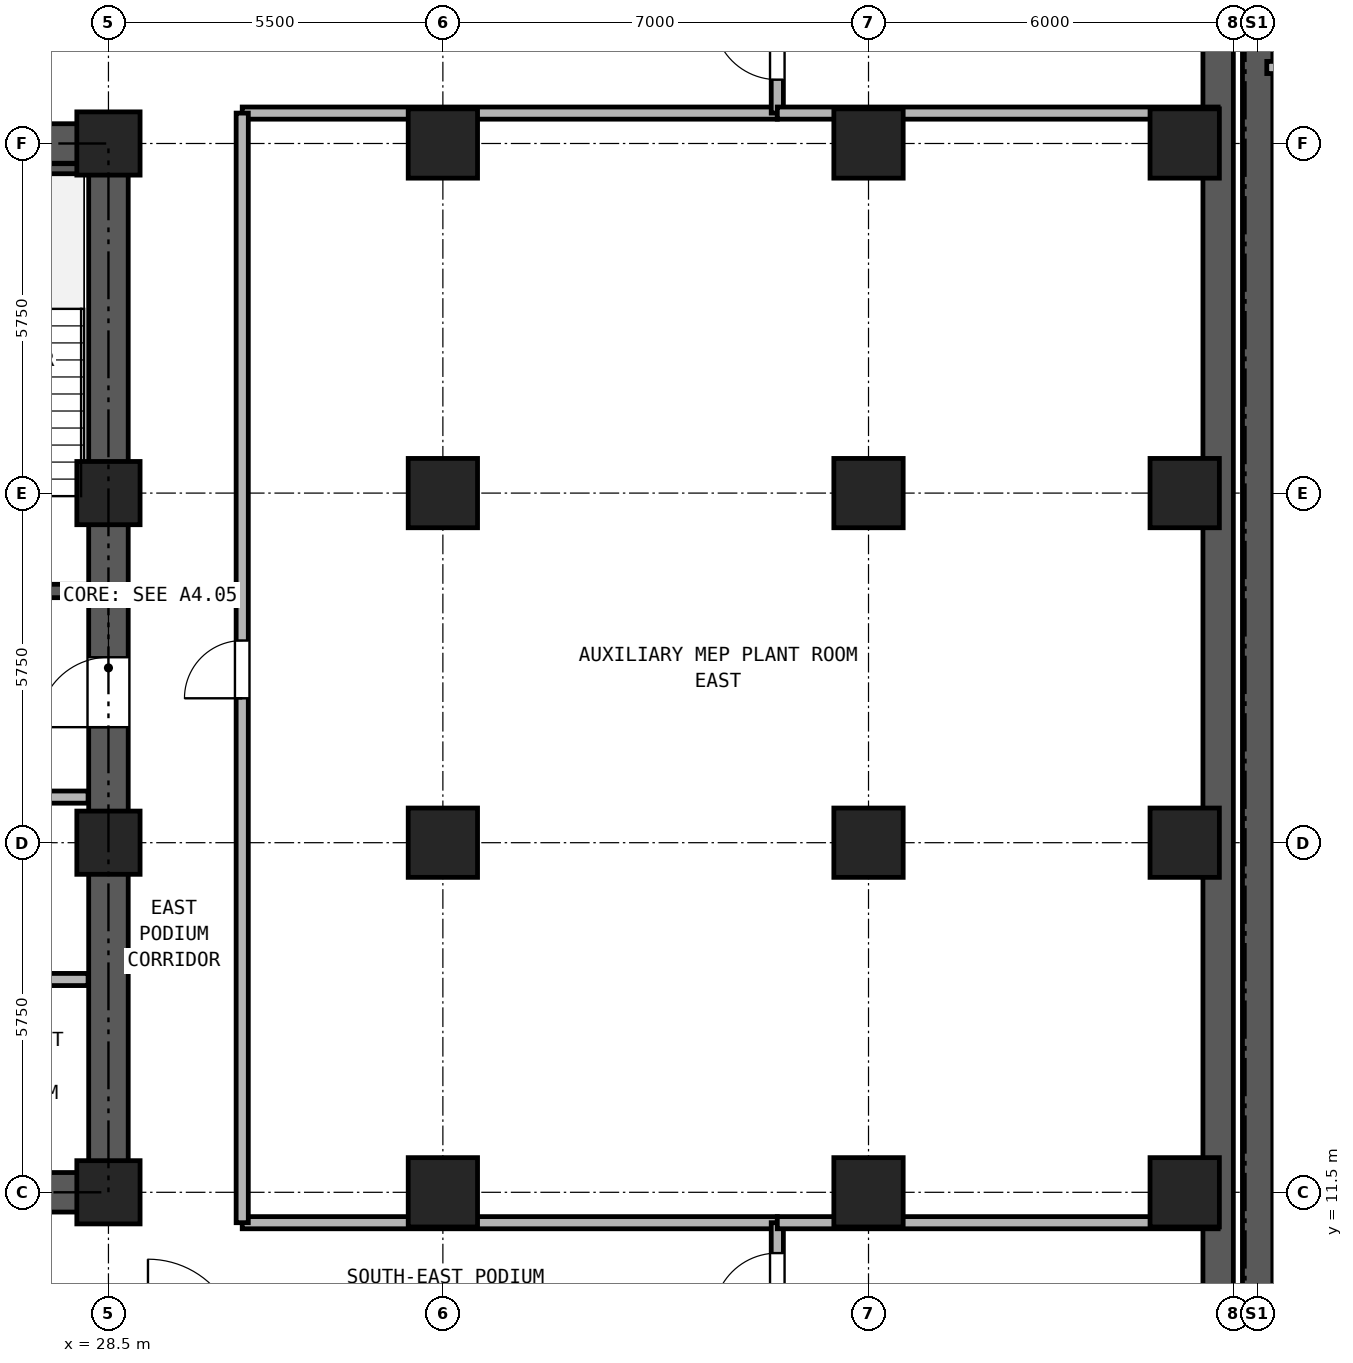
"""IFC4 building model, lengths in metres.
Left out: names, types, materials, properties, quantities, classifications, styles, units other than length and angle.
Written with IfcOpenShell. Run it as: python <this file> out.ifc"""

import sys

from ifc_helpers import new_model, si_unit, direction, frame, frame_2d, origin, origin_2d, place, context, subcontext, project, spatial, rectangle, hollow_rectangle, extrude, source, transform, mapped, element, fill, save


model = new_model("IFC4")
c1 = context("Model", 3, precision=1e-05, world=origin(), true_north=direction((0.0, 1.0)))
c2 = subcontext(c1, "Body", "Model", "MODEL_VIEW")
j1 = project(units=[si_unit("LENGTHUNIT", "METRE"), si_unit("PLANEANGLEUNIT", "RADIAN")], contexts=[c1])
p1 = place(None, origin())
s1 = spatial("IfcSite", under=j1, at=p1, CompositionType="ELEMENT")
p2 = place(p1, origin())
s2 = spatial("IfcBuilding", under=s1, at=p2, CompositionType="ELEMENT")
p3 = place(p2, frame((0.0, 0.0, -8.4)))
s3 = spatial("IfcBuildingStorey", under=s2, at=p3, CompositionType="ELEMENT", Elevation=-8.4)
m1 = source(origin(), c2, "Body", "SweptSolid", [
    extrude(hollow_rectangle(XDim=1.14, YDim=1.14, WallThickness=0.07, at=origin_2d()), origin(), (0.0, 0.0, 1.0), 3.88),
])
for number, where, z_axis, x_axis in (
    (1, (46.2, 11.5, 0.0), (0.0, 0.0, 1.0), (1.0, 0.0, 0.0)),
    (2, (46.2, 17.25, 0.0), (0.0, 0.0, 1.0), (1.0, 0.0, 0.0)),
    (3, (46.2, 23.0, 0.0), (0.0, 0.0, 1.0), (1.0, 0.0, 0.0)),
    (4, (46.2, 28.75, 0.0), (0.0, 0.0, 1.0), (1.0, 0.0, 0.0)),
):
    element("IfcColumn", number, at=place(p3, frame(where, z_axis=z_axis, x_axis=x_axis)), inside=s3, PredefinedType="COLUMN", context=c2, shape_type="MappedRepresentation", body=[
        mapped(m1, transform((0.0, 0.0, 0.0), x_axis=(1.0, 0.0, 0.0), y_axis=(0.0, 1.0, 0.0), z_axis=(0.0, 0.0, 1.0), scale=1.0)),
    ])
m2 = source(origin(), c2, "Body", "SweptSolid", [
    extrude(hollow_rectangle(XDim=1.04, YDim=1.04, WallThickness=0.065, at=origin_2d()), origin(), (0.0, 0.0, 1.0), 3.88),
])
for number, where, z_axis, x_axis in (
    (5, (28.5, 11.5, 0.0), (0.0, 0.0, 1.0), (1.0, 0.0, 0.0)),
    (6, (28.5, 17.25, 0.0), (0.0, 0.0, 1.0), (1.0, 0.0, 0.0)),
    (7, (28.5, 23.0, 0.0), (0.0, 0.0, 1.0), (1.0, 0.0, 0.0)),
    (8, (28.5, 28.75, 0.0), (0.0, 0.0, 1.0), (1.0, 0.0, 0.0)),
):
    element("IfcColumn", number, at=place(p3, frame(where, z_axis=z_axis, x_axis=x_axis)), inside=s3, PredefinedType="COLUMN", context=c2, shape_type="MappedRepresentation", body=[
        mapped(m2, transform((0.0, 0.0, 0.0), x_axis=(1.0, 0.0, 0.0), y_axis=(0.0, 1.0, 0.0), z_axis=(0.0, 0.0, 1.0), scale=1.0)),
    ])
for number, where, z_axis, x_axis in (
    (9, (34.0, 11.5, 0.0), (0.0, 0.0, 1.0), (1.0, 0.0, 0.0)),
    (10, (34.0, 17.25, 0.0), (0.0, 0.0, 1.0), (1.0, 0.0, 0.0)),
    (11, (34.0, 23.0, 0.0), (0.0, 0.0, 1.0), (1.0, 0.0, 0.0)),
    (12, (34.0, 28.75, 0.0), (0.0, 0.0, 1.0), (1.0, 0.0, 0.0)),
    (13, (41.0, 11.5, 0.0), (0.0, 0.0, 1.0), (1.0, 0.0, 0.0)),
    (14, (41.0, 17.25, 0.0), (0.0, 0.0, 1.0), (1.0, 0.0, 0.0)),
    (15, (41.0, 23.0, 0.0), (0.0, 0.0, 1.0), (1.0, 0.0, 0.0)),
    (16, (41.0, 28.75, 0.0), (0.0, 0.0, 1.0), (1.0, 0.0, 0.0)),
):
    element("IfcColumn", number, at=place(p3, frame(where, z_axis=z_axis, x_axis=x_axis)), inside=s3, PredefinedType="COLUMN", context=c2, shape_type="MappedRepresentation", body=[
        mapped(m1, transform((0.0, 0.0, 0.0), x_axis=(1.0, 0.0, 0.0), y_axis=(0.0, 1.0, 0.0), z_axis=(0.0, 0.0, 1.0), scale=1.0)),
    ])
p4 = place(p3, frame((46.75, 4.0, 0.0), z_axis=(0.0, 0.0, 1.0), x_axis=(0.0, 1.0, 0.0)))
e17 = element("IfcWall", 17, at=p4, inside=s3, PredefinedType="USERDEFINED", context=c2, shape_type="SweptSolid", body=[
    extrude(rectangle(XDim=32.5, YDim=0.5, at=frame_2d((16.25, 0.0))), origin(), (0.0, 0.0, 1.0), 3.88),
])
p5 = place(p3, frame((47.4, 40.5, 0.0), z_axis=(0.0, 0.0, 1.0), x_axis=(0.0, -1.0, 0.0)))
e18 = element("IfcWall", 18, at=p5, inside=s3, PredefinedType="USERDEFINED", context=c2, shape_type="SweptSolid", body=[
    extrude(rectangle(XDim=40.9, YDim=0.5, at=frame_2d((20.45, 0.0))), origin(), (0.0, 0.0, 1.0), 3.88),
])
p6 = place(p3, frame((18.175, 11.5, 0.0), z_axis=(0.0, 0.0, 1.0), x_axis=(1.0, 0.0, 0.0)))
e19 = element("IfcWall", 19, at=p6, inside=s3, PredefinedType="SHEAR", context=c2, shape_type="SweptSolid", body=[
    extrude(rectangle(XDim=10.65, YDim=0.65, at=frame_2d((5.325, 0.0))), origin(), (0.0, 0.0, 1.0), 3.88),
])
p7 = place(p6, frame((1.195, 0.0, 0.0)))
e20 = element("IfcOpeningElement", 20, at=p7, cuts=e19, PredefinedType="OPENING", context=c2, shape_type="SweptSolid", body=[
    extrude(rectangle(XDim=1.1, YDim=2.25, at=frame_2d((0.55, 1.125))), frame((0.0, 0.335, 0.0), z_axis=(0.0, -1.0, 0.0), x_axis=(1.0, 0.0, 0.0)), (0.0, 0.0, 1.0), 0.67),
])
p8 = place(p6, frame((3.495, 0.0, 0.0)))
e21 = element("IfcOpeningElement", 21, at=p8, cuts=e19, PredefinedType="OPENING", context=c2, shape_type="SweptSolid", body=[
    extrude(rectangle(XDim=1.1, YDim=2.25, at=frame_2d((0.55, 1.125))), frame((0.0, 0.335, 0.0), z_axis=(0.0, -1.0, 0.0), x_axis=(1.0, 0.0, 0.0)), (0.0, 0.0, 1.0), 0.67),
])
p9 = place(p6, frame((5.925, 0.0, 0.0)))
e22 = element("IfcOpeningElement", 22, at=p9, cuts=e19, PredefinedType="OPENING", context=c2, shape_type="SweptSolid", body=[
    extrude(rectangle(XDim=1.05, YDim=2.15, at=frame_2d((0.525, 1.075))), frame((0.0, 0.335, 0.0), z_axis=(0.0, -1.0, 0.0), x_axis=(1.0, 0.0, 0.0)), (0.0, 0.0, 1.0), 0.67),
])
p10 = place(p6, frame((8.325, 0.0, 0.0)))
e23 = element("IfcOpeningElement", 23, at=p10, cuts=e19, PredefinedType="OPENING", context=c2, shape_type="SweptSolid", body=[
    extrude(rectangle(XDim=1.05, YDim=2.15, at=frame_2d((0.525, 1.075))), frame((0.0, 0.335, 0.0), z_axis=(0.0, -1.0, 0.0), x_axis=(1.0, 0.0, 0.0)), (0.0, 0.0, 1.0), 0.67),
])
p11 = place(p3, frame((18.175, 28.75, 0.0), z_axis=(0.0, 0.0, 1.0), x_axis=(1.0, 0.0, 0.0)))
e24 = element("IfcWall", 24, at=p11, inside=s3, PredefinedType="SHEAR", context=c2, shape_type="SweptSolid", body=[
    extrude(rectangle(XDim=10.65, YDim=0.65, at=frame_2d((5.325, 0.0))), origin(), (0.0, 0.0, 1.0), 3.88),
])
p12 = place(p11, frame((4.205, 0.0, 0.0)))
e25 = element("IfcOpeningElement", 25, at=p12, cuts=e24, PredefinedType="OPENING", context=c2, shape_type="SweptSolid", body=[
    extrude(rectangle(XDim=0.9, YDim=2.05, at=frame_2d((0.45, 1.025))), frame((0.0, 0.335, 0.0), z_axis=(0.0, -1.0, 0.0), x_axis=(1.0, 0.0, 0.0)), (0.0, 0.0, 1.0), 0.67),
])
p13 = place(p11, frame((5.745, 0.0, 0.0)))
e26 = element("IfcOpeningElement", 26, at=p13, cuts=e24, PredefinedType="OPENING", context=c2, shape_type="SweptSolid", body=[
    extrude(rectangle(XDim=0.9, YDim=2.05, at=frame_2d((0.45, 1.025))), frame((0.0, 0.335, 0.0), z_axis=(0.0, -1.0, 0.0), x_axis=(1.0, 0.0, 0.0)), (0.0, 0.0, 1.0), 0.67),
])
p14 = place(p3, frame((28.5, 11.825, 0.0), z_axis=(0.0, 0.0, 1.0), x_axis=(0.0, 1.0, 0.0)))
e27 = element("IfcWall", 27, at=p14, inside=s3, PredefinedType="SHEAR", context=c2, shape_type="SweptSolid", body=[
    extrude(rectangle(XDim=16.6, YDim=0.65, at=frame_2d((8.3, 0.0))), origin(), (0.0, 0.0, 1.0), 3.88),
])
p15 = place(p14, frame((7.325, 0.0, 0.0)))
e28 = element("IfcOpeningElement", 28, at=p15, cuts=e27, PredefinedType="OPENING", context=c2, shape_type="SweptSolid", body=[
    extrude(rectangle(XDim=1.15, YDim=2.2, at=frame_2d((0.575, 1.1))), frame((0.0, 0.335, 0.0), z_axis=(0.0, -1.0, 0.0), x_axis=(1.0, 0.0, 0.0)), (0.0, 0.0, 1.0), 0.67),
])
p16 = place(p3, frame((25.13, 28.335, 0.0), z_axis=(0.0, 0.0, 1.0), x_axis=(1.0, 0.0, 0.0)))
e29 = element("IfcWall", 29, at=p16, inside=s3, PredefinedType="PARTITIONING", context=c2, shape_type="SweptSolid", body=[
    extrude(rectangle(XDim=3.035, YDim=0.165, at=frame_2d((1.518, 0.0))), origin(), (0.0, 0.0, 1.0), 3.88),
])
p17 = place(p3, frame((25.13, 21.39, 0.0), z_axis=(0.0, 0.0, 1.0), x_axis=(1.0, 0.0, 0.0)))
e30 = element("IfcWall", 30, at=p17, inside=s3, PredefinedType="SOLIDWALL", context=c2, shape_type="SweptSolid", body=[
    extrude(rectangle(XDim=3.035, YDim=0.22, at=frame_2d((1.518, 0.0))), origin(), (0.0, 0.0, 1.0), 3.88),
])
p18 = place(p17, frame((0.92, 0.0, 0.0)))
e31 = element("IfcOpeningElement", 31, at=p18, cuts=e30, PredefinedType="OPENING", context=c2, shape_type="SweptSolid", body=[
    extrude(rectangle(XDim=1.15, YDim=2.2, at=frame_2d((0.575, 1.1))), frame((0.0, 0.12, 0.0), z_axis=(0.0, -1.0, 0.0), x_axis=(1.0, 0.0, 0.0)), (0.0, 0.0, 1.0), 0.24),
])
p19 = place(p3, frame((18.835, 18.0, 0.0), z_axis=(0.0, 0.0, 1.0), x_axis=(1.0, 0.0, 0.0)))
e32 = element("IfcWall", 32, at=p19, inside=s3, PredefinedType="PARTITIONING", context=c2, shape_type="SweptSolid", body=[
    extrude(rectangle(XDim=9.33, YDim=0.2, at=frame_2d((4.665, 0.0))), origin(), (0.0, 0.0, 1.0), 3.88),
])
p20 = place(p19, frame((0.415, 0.0, 0.0)))
e33 = element("IfcOpeningElement", 33, at=p20, cuts=e32, PredefinedType="OPENING", context=c2, shape_type="SweptSolid", body=[
    extrude(rectangle(XDim=1.3, YDim=2.3, at=frame_2d((0.65, 1.15))), frame((0.0, 0.11, 0.0), z_axis=(0.0, -1.0, 0.0), x_axis=(1.0, 0.0, 0.0)), (0.0, 0.0, 1.0), 0.22),
])
p21 = place(p19, frame((2.515, 0.0, 0.0)))
e34 = element("IfcOpeningElement", 34, at=p21, cuts=e32, PredefinedType="OPENING", context=c2, shape_type="SweptSolid", body=[
    extrude(rectangle(XDim=1.3, YDim=2.3, at=frame_2d((0.65, 1.15))), frame((0.0, 0.11, 0.0), z_axis=(0.0, -1.0, 0.0), x_axis=(1.0, 0.0, 0.0)), (0.0, 0.0, 1.0), 0.22),
])
p22 = place(p19, frame((7.015, 0.0, 0.0)))
e35 = element("IfcOpeningElement", 35, at=p22, cuts=e32, PredefinedType="OPENING", context=c2, shape_type="SweptSolid", body=[
    extrude(rectangle(XDim=1.0, YDim=2.15, at=frame_2d((0.5, 1.075))), frame((0.0, 0.11, 0.0), z_axis=(0.0, -1.0, 0.0), x_axis=(1.0, 0.0, 0.0)), (0.0, 0.0, 1.0), 0.22),
])
p23 = place(p3, frame((18.835, 15.0, 0.0), z_axis=(0.0, 0.0, 1.0), x_axis=(1.0, 0.0, 0.0)))
e36 = element("IfcWall", 36, at=p23, inside=s3, PredefinedType="PARTITIONING", context=c2, shape_type="SweptSolid", body=[
    extrude(rectangle(XDim=9.33, YDim=0.2, at=frame_2d((4.665, 0.0))), origin(), (0.0, 0.0, 1.0), 3.88),
])
for number, where, z_axis, x_axis in (
    (37, (30.7, 11.0, 0.0), (0.0, 0.0, 1.0), (1.0, 0.0, 0.0)),
    (38, (30.7, 29.25, 0.0), (0.0, 0.0, 1.0), (1.0, 0.0, 0.0)),
):
    element("IfcWall", number, at=place(p3, frame(where, z_axis=z_axis, x_axis=x_axis)), inside=s3, PredefinedType="PARTITIONING", context=c2, shape_type="SweptSolid", body=[
        extrude(rectangle(XDim=8.8, YDim=0.2, at=frame_2d((4.4, 0.0))), origin(), (0.0, 0.0, 1.0), 3.88),
    ])
p24 = place(p3, frame((30.7, 11.0, 0.0), z_axis=(0.0, 0.0, 1.0), x_axis=(0.0, 1.0, 0.0)))
e39 = element("IfcWall", 39, at=p24, inside=s3, PredefinedType="PARTITIONING", context=c2, shape_type="SweptSolid", body=[
    extrude(rectangle(XDim=18.25, YDim=0.2, at=frame_2d((9.125, 0.0))), origin(), (0.0, 0.0, 1.0), 3.88),
])
p25 = place(p24, frame((8.625, 0.0, 0.0)))
e40 = element("IfcOpeningElement", 40, at=p25, cuts=e39, PredefinedType="OPENING", context=c2, shape_type="SweptSolid", body=[
    extrude(rectangle(XDim=0.95, YDim=2.15, at=frame_2d((0.475, 1.075))), frame((0.0, 0.11, 0.0), z_axis=(0.0, -1.0, 0.0), x_axis=(1.0, 0.0, 0.0)), (0.0, 0.0, 1.0), 0.22),
])
p26 = place(p3, frame((39.5, 0.25, 0.0), z_axis=(0.0, 0.0, 1.0), x_axis=(0.0, 1.0, 0.0)))
e41 = element("IfcWall", 41, at=p26, inside=s3, PredefinedType="PARTITIONING", context=c2, shape_type="SweptSolid", body=[
    extrude(rectangle(XDim=10.75, YDim=0.2, at=frame_2d((5.375, 0.0))), origin(), (0.0, 0.0, 1.0), 3.88),
])
p27 = place(p26, frame((9.2, 0.0, 0.0)))
e42 = element("IfcOpeningElement", 42, at=p27, cuts=e41, PredefinedType="OPENING", context=c2, shape_type="SweptSolid", body=[
    extrude(rectangle(XDim=1.05, YDim=2.15, at=frame_2d((0.525, 1.075))), frame((0.0, 0.11, 0.0), z_axis=(0.0, -1.0, 0.0), x_axis=(1.0, 0.0, 0.0)), (0.0, 0.0, 1.0), 0.22),
])
p28 = place(p3, frame((39.5, 29.25, 0.0), z_axis=(0.0, 0.0, 1.0), x_axis=(0.0, 1.0, 0.0)))
e43 = element("IfcWall", 43, at=p28, inside=s3, PredefinedType="PARTITIONING", context=c2, shape_type="SweptSolid", body=[
    extrude(rectangle(XDim=11.0, YDim=0.2, at=frame_2d((5.5, 0.0))), origin(), (0.0, 0.0, 1.0), 3.88),
])
p29 = place(p28, frame((0.55, 0.0, 0.0)))
e44 = element("IfcOpeningElement", 44, at=p29, cuts=e43, PredefinedType="OPENING", context=c2, shape_type="SweptSolid", body=[
    extrude(rectangle(XDim=1.05, YDim=2.15, at=frame_2d((0.525, 1.075))), frame((0.0, 0.11, 0.0), z_axis=(0.0, -1.0, 0.0), x_axis=(1.0, 0.0, 0.0)), (0.0, 0.0, 1.0), 0.22),
])
for number, where, z_axis, x_axis in (
    (45, (39.5, 11.0, 0.0), (0.0, 0.0, 1.0), (1.0, 0.0, 0.0)),
    (46, (39.5, 29.25, 0.0), (0.0, 0.0, 1.0), (1.0, 0.0, 0.0)),
):
    element("IfcWall", number, at=place(p3, frame(where, z_axis=z_axis, x_axis=x_axis)), inside=s3, PredefinedType="PARTITIONING", context=c2, shape_type="SweptSolid", body=[
        extrude(rectangle(XDim=7.25, YDim=0.2, at=frame_2d((3.625, 0.0))), origin(), (0.0, 0.0, 1.0), 3.88),
    ])
p30 = place(p3, frame((47.55, 30.0, 0.0), z_axis=(0.0, 0.0, 1.0), x_axis=(1.0, 0.0, 0.0)))
e47 = element("IfcWall", 47, at=p30, inside=s3, PredefinedType="PARTITIONING", context=c2, shape_type="SweptSolid", body=[
    extrude(rectangle(XDim=23.9, YDim=0.2, at=frame_2d((11.95, 0.0))), origin(), (0.0, 0.0, 1.0), 3.88),
])
p31 = place(p30, frame((3.45, 0.0, 0.0)))
e48 = element("IfcOpeningElement", 48, at=p31, cuts=e47, PredefinedType="OPENING", context=c2, shape_type="SweptSolid", body=[
    extrude(rectangle(XDim=1.3, YDim=2.2, at=frame_2d((0.65, 1.1))), frame((0.0, 0.11, 0.0), z_axis=(0.0, -1.0, 0.0), x_axis=(1.0, 0.0, 0.0)), (0.0, 0.0, 1.0), 0.22),
])
p32 = place(p15, origin())
e49 = element("IfcDoor", 49, at=p32, inside=s3, OperationType="SINGLE_SWING_LEFT", PredefinedType="DOOR", context=c2, shape_type="SweptSolid", body=[
    extrude(rectangle(XDim=1.15, YDim=2.2, at=frame_2d((0.575, 1.1))), frame((0.0, 0.025, 0.0), z_axis=(0.0, -1.0, 0.0), x_axis=(1.0, 0.0, 0.0)), (0.0, 0.0, 1.0), 0.05),
])
fill(e28, e49)
p33 = place(p27, origin())
e50 = element("IfcDoor", 50, at=p33, inside=s3, OperationType="SINGLE_SWING_LEFT", PredefinedType="DOOR", context=c2, shape_type="SweptSolid", body=[
    extrude(rectangle(XDim=1.05, YDim=2.15, at=frame_2d((0.525, 1.075))), frame((0.0, 0.025, 0.0), z_axis=(0.0, -1.0, 0.0), x_axis=(1.0, 0.0, 0.0)), (0.0, 0.0, 1.0), 0.05),
])
fill(e42, e50)
p34 = place(p29, origin())
e51 = element("IfcDoor", 51, at=p34, inside=s3, OperationType="SINGLE_SWING_RIGHT", PredefinedType="DOOR", context=c2, shape_type="SweptSolid", body=[
    extrude(rectangle(XDim=1.05, YDim=2.15, at=frame_2d((0.525, 1.075))), frame((0.0, 0.025, 0.0), z_axis=(0.0, -1.0, 0.0), x_axis=(1.0, 0.0, 0.0)), (0.0, 0.0, 1.0), 0.05),
])
fill(e44, e51)
p35 = place(p25, origin())
e52 = element("IfcDoor", 52, at=p35, inside=s3, OperationType="SINGLE_SWING_LEFT", PredefinedType="DOOR", context=c2, shape_type="SweptSolid", body=[
    extrude(rectangle(XDim=0.95, YDim=2.15, at=frame_2d((0.475, 1.075))), frame((0.0, 0.025, 0.0), z_axis=(0.0, -1.0, 0.0), x_axis=(1.0, 0.0, 0.0)), (0.0, 0.0, 1.0), 0.05),
])
fill(e40, e52)
save(model, sys.argv[1])
